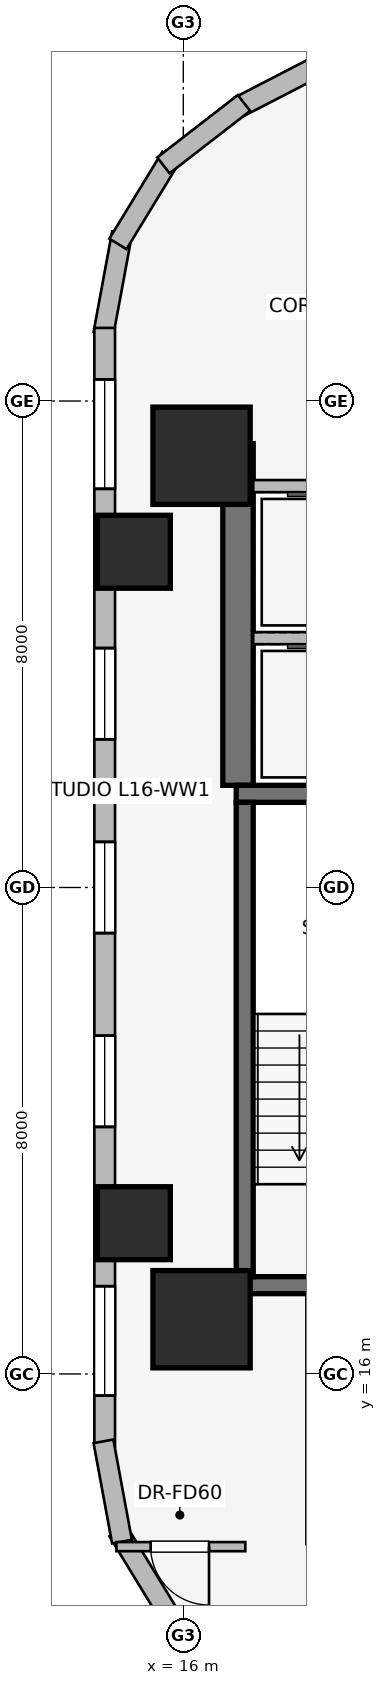
"""IFC4 building model, lengths in metres.
Left out: names, types, materials, properties, quantities, classifications, styles, units other than length and angle.
Written with IfcOpenShell. Run it as: python <this file> out.ifc"""

import sys

from ifc_helpers import new_model, si_unit, direction, frame, frame_2d, origin, origin_2d, place, context, subcontext, project, spatial, rectangle, extrude, element, fill, save


model = new_model("IFC4")
c1 = context("Model", 3, precision=1e-05, world=origin(), true_north=direction((0.0, 1.0)))
c2 = subcontext(c1, "Body", "Model", "MODEL_VIEW")
j1 = project(units=[si_unit("LENGTHUNIT", "METRE"), si_unit("PLANEANGLEUNIT", "RADIAN")], contexts=[c1])
p1 = place(None, origin())
s1 = spatial("IfcSite", under=j1, at=p1, CompositionType="ELEMENT")
p2 = place(p1, origin())
s2 = spatial("IfcBuilding", under=s1, at=p2, CompositionType="ELEMENT")
p3 = place(p2, frame((0.0, 0.0, 63.5)))
s3 = spatial("IfcBuildingStorey", under=s2, at=p3, CompositionType="ELEMENT", Elevation=63.5)
p4 = place(p3, frame((16.9, 25.68, 0.0), z_axis=(0.0, 0.0, 1.0), x_axis=(0.0, 1.0, 0.0)))
e1 = element("IfcWall", 1, at=p4, inside=s3, PredefinedType="SHEAR", context=c2, shape_type="SweptSolid", body=[
    extrude(rectangle(XDim=5.62, YDim=0.5, at=frame_2d((2.81, 0.0))), origin(), (0.0, 0.0, 1.0), 3.65),
])
for number, where, z_axis, x_axis in (
    (2, (16.87, 17.46, 0.0), (0.0, 0.0, 1.0), (1.0, 0.0, 0.0)),
    (3, (20.63, 25.54, 0.0), (0.0, 0.0, 1.0), (-1.0, 0.0, 0.0)),
):
    element("IfcWall", number, at=place(p3, frame(where, z_axis=z_axis, x_axis=x_axis)), inside=s3, PredefinedType="SHEAR", context=c2, shape_type="SweptSolid", body=[
        extrude(rectangle(XDim=3.76, YDim=0.28, at=frame_2d((1.88, 0.0))), origin(), (0.0, 0.0, 1.0), 3.65),
    ])
p5 = place(p3, frame((17.01, 25.4, 0.0), z_axis=(0.0, 0.0, 1.0), x_axis=(0.0, -1.0, 0.0)))
e4 = element("IfcWall", 4, at=p5, inside=s3, PredefinedType="SHEAR", context=c2, shape_type="SweptSolid", body=[
    extrude(rectangle(XDim=7.8, YDim=0.28, at=frame_2d((3.9, 0.0))), origin(), (0.0, 0.0, 1.0), 3.65),
])
for number, where, z_axis, x_axis in (
    (5, (16.3, 16.9, 0.0), (0.0, 0.0, 1.0), (1.0, 0.0, 0.0)),
    (6, (16.3, 31.1, 0.0), (0.0, 0.0, 1.0), (1.0, 0.0, 0.0)),
):
    element("IfcColumn", number, at=place(p3, frame(where, z_axis=z_axis, x_axis=x_axis)), inside=s3, PredefinedType="COLUMN", context=c2, shape_type="SweptSolid", body=[
        extrude(rectangle(XDim=1.6, YDim=1.6, at=origin_2d()), origin(), (0.0, 0.0, 1.0), 3.65),
    ])
for number, where, z_axis, x_axis in (
    (7, (15.187, 29.521, 0.0), (0.0, 0.0, 1.0), (1.0, 0.0, 0.0)),
    (8, (15.187, 18.479, 0.0), (0.0, 0.0, 1.0), (1.0, 0.0, 0.0)),
):
    element("IfcColumn", number, at=place(p3, frame(where, z_axis=z_axis, x_axis=x_axis)), inside=s3, PredefinedType="COLUMN", context=c2, shape_type="SweptSolid", body=[
        extrude(rectangle(XDim=1.2, YDim=1.2, at=origin_2d()), origin(), (0.0, 0.0, 1.0), 3.65),
    ])
p6 = place(p3, frame((16.924, 36.841, 0.0), z_axis=(0.0, 0.0, 1.0), x_axis=(0.888634413993, 0.458616264721, 0.0)))
e9 = element("IfcWall", 9, at=p6, inside=s3, PredefinedType="STANDARD", context=c2, shape_type="SweptSolid", body=[
    extrude(rectangle(XDim=20.531, YDim=0.34, at=frame_2d((10.266, 0.0))), origin(), (0.0, 0.0, 1.0), 2.684),
])
p7 = place(p6, frame((2.161, 0.0, 0.75)))
e10 = element("IfcOpeningElement", 10, at=p7, cuts=e9, PredefinedType="OPENING", context=c2, shape_type="SweptSolid", body=[
    extrude(rectangle(XDim=1.05, YDim=1.4, at=frame_2d((0.525, 0.7))), frame((0.0, 0.18, 0.0), z_axis=(0.0, -1.0, 0.0), x_axis=(1.0, 0.0, 0.0)), (0.0, 0.0, 1.0), 0.36),
])
p8 = place(p6, frame((5.903, 0.0, 0.75)))
e11 = element("IfcOpeningElement", 11, at=p8, cuts=e9, PredefinedType="OPENING", context=c2, shape_type="SweptSolid", body=[
    extrude(rectangle(XDim=1.5, YDim=1.5, at=frame_2d((0.75, 0.75))), frame((0.0, 0.18, 0.0), z_axis=(0.0, -1.0, 0.0), x_axis=(1.0, 0.0, 0.0)), (0.0, 0.0, 1.0), 0.36),
])
p9 = place(p6, frame((9.516, 0.0, 0.75)))
e12 = element("IfcOpeningElement", 12, at=p9, cuts=e9, PredefinedType="OPENING", context=c2, shape_type="SweptSolid", body=[
    extrude(rectangle(XDim=1.5, YDim=1.5, at=frame_2d((0.75, 0.75))), frame((0.0, 0.18, 0.0), z_axis=(0.0, -1.0, 0.0), x_axis=(1.0, 0.0, 0.0)), (0.0, 0.0, 1.0), 0.36),
])
p10 = place(p6, frame((13.129, 0.0, 0.75)))
e13 = element("IfcOpeningElement", 13, at=p10, cuts=e9, PredefinedType="OPENING", context=c2, shape_type="SweptSolid", body=[
    extrude(rectangle(XDim=1.5, YDim=1.5, at=frame_2d((0.75, 0.75))), frame((0.0, 0.18, 0.0), z_axis=(0.0, -1.0, 0.0), x_axis=(1.0, 0.0, 0.0)), (0.0, 0.0, 1.0), 0.36),
])
p11 = place(p6, frame((17.476, 0.0, 0.75)))
e14 = element("IfcOpeningElement", 14, at=p11, cuts=e9, PredefinedType="OPENING", context=c2, shape_type="SweptSolid", body=[
    extrude(rectangle(XDim=1.05, YDim=1.4, at=frame_2d((0.525, 0.7))), frame((0.0, 0.18, 0.0), z_axis=(0.0, -1.0, 0.0), x_axis=(1.0, 0.0, 0.0)), (0.0, 0.0, 1.0), 0.36),
])
p12 = place(p3, frame((14.687, 33.108, 0.0), z_axis=(0.0, 0.0, 1.0), x_axis=(0.181714143354, 0.983351397063, 0.0)))
e15 = element("IfcWall", 15, at=p12, inside=s3, PredefinedType="STANDARD", context=c2, shape_type="SweptSolid", body=[
    extrude(rectangle(XDim=1.678, YDim=0.33, at=frame_2d((0.839, 0.0))), origin(), (0.0, 0.0, 1.0), 3.39),
])
p13 = place(p3, frame((14.925, 34.583, 0.0), z_axis=(0.0, 0.0, 1.0), x_axis=(0.520584129191, 0.853810379671, 0.0)))
e16 = element("IfcWall", 16, at=p13, inside=s3, PredefinedType="STANDARD", context=c2, shape_type="SweptSolid", body=[
    extrude(rectangle(XDim=1.677, YDim=0.33, at=frame_2d((0.838, 0.0))), origin(), (0.0, 0.0, 1.0), 3.39),
])
p14 = place(p3, frame((15.673, 35.875, 0.0), z_axis=(0.0, 0.0, 1.0), x_axis=(0.790691856293, 0.61221433207, 0.0)))
e17 = element("IfcWall", 17, at=p14, inside=s3, PredefinedType="STANDARD", context=c2, shape_type="SweptSolid", body=[
    extrude(rectangle(XDim=1.676, YDim=0.33, at=frame_2d((0.838, 0.0))), origin(), (0.0, 0.0, 1.0), 3.39),
])
p15 = place(p3, frame((14.707, 14.798, 0.0), z_axis=(0.0, 0.0, 1.0), x_axis=(0.0, 1.0, 0.0)))
e18 = element("IfcWall", 18, at=p15, inside=s3, PredefinedType="STANDARD", context=c2, shape_type="SweptSolid", body=[
    extrude(rectangle(XDim=18.404, YDim=0.34, at=frame_2d((9.202, 0.0))), origin(), (0.0, 0.0, 1.0), 2.684),
])
p16 = place(p15, frame((0.845, 0.0, 0.75)))
e19 = element("IfcOpeningElement", 19, at=p16, cuts=e18, PredefinedType="OPENING", context=c2, shape_type="SweptSolid", body=[
    extrude(rectangle(XDim=1.8, YDim=1.5, at=frame_2d((0.9, 0.75))), frame((0.0, 0.18, 0.0), z_axis=(0.0, -1.0, 0.0), x_axis=(1.0, 0.0, 0.0)), (0.0, 0.0, 1.0), 0.36),
])
p17 = place(p15, frame((5.265, 0.0, 0.75)))
e20 = element("IfcOpeningElement", 20, at=p17, cuts=e18, PredefinedType="OPENING", context=c2, shape_type="SweptSolid", body=[
    extrude(rectangle(XDim=1.5, YDim=1.5, at=frame_2d((0.75, 0.75))), frame((0.0, 0.18, 0.0), z_axis=(0.0, -1.0, 0.0), x_axis=(1.0, 0.0, 0.0)), (0.0, 0.0, 1.0), 0.36),
])
p18 = place(p15, frame((8.452, 0.0, 0.75)))
e21 = element("IfcOpeningElement", 21, at=p18, cuts=e18, PredefinedType="OPENING", context=c2, shape_type="SweptSolid", body=[
    extrude(rectangle(XDim=1.5, YDim=1.5, at=frame_2d((0.75, 0.75))), frame((0.0, 0.18, 0.0), z_axis=(0.0, -1.0, 0.0), x_axis=(1.0, 0.0, 0.0)), (0.0, 0.0, 1.0), 0.36),
])
p19 = place(p15, frame((11.639, 0.0, 0.75)))
e22 = element("IfcOpeningElement", 22, at=p19, cuts=e18, PredefinedType="OPENING", context=c2, shape_type="SweptSolid", body=[
    extrude(rectangle(XDim=1.5, YDim=1.5, at=frame_2d((0.75, 0.75))), frame((0.0, 0.18, 0.0), z_axis=(0.0, -1.0, 0.0), x_axis=(1.0, 0.0, 0.0)), (0.0, 0.0, 1.0), 0.36),
])
p20 = place(p15, frame((15.758, 0.0, 0.75)))
e23 = element("IfcOpeningElement", 23, at=p20, cuts=e18, PredefinedType="OPENING", context=c2, shape_type="SweptSolid", body=[
    extrude(rectangle(XDim=1.8, YDim=1.5, at=frame_2d((0.9, 0.75))), frame((0.0, 0.18, 0.0), z_axis=(0.0, -1.0, 0.0), x_axis=(1.0, 0.0, 0.0)), (0.0, 0.0, 1.0), 0.36),
])
p21 = place(p3, frame((16.998, 11.099, 0.0), z_axis=(0.0, 0.0, 1.0), x_axis=(-0.790691856293, 0.61221433207, 0.0)))
e24 = element("IfcWall", 24, at=p21, inside=s3, PredefinedType="STANDARD", context=c2, shape_type="SweptSolid", body=[
    extrude(rectangle(XDim=1.676, YDim=0.33, at=frame_2d((0.838, 0.0))), origin(), (0.0, 0.0, 1.0), 3.39),
])
p22 = place(p3, frame((15.798, 11.985, 0.0), z_axis=(0.0, 0.0, 1.0), x_axis=(-0.520584129191, 0.853810379671, 0.0)))
e25 = element("IfcWall", 25, at=p22, inside=s3, PredefinedType="STANDARD", context=c2, shape_type="SweptSolid", body=[
    extrude(rectangle(XDim=1.677, YDim=0.33, at=frame_2d((0.838, 0.0))), origin(), (0.0, 0.0, 1.0), 3.39),
])
p23 = place(p3, frame((14.992, 13.242, 0.0), z_axis=(0.0, 0.0, 1.0), x_axis=(-0.181714143354, 0.983351397063, 0.0)))
e26 = element("IfcWall", 26, at=p23, inside=s3, PredefinedType="STANDARD", context=c2, shape_type="SweptSolid", body=[
    extrude(rectangle(XDim=1.678, YDim=0.33, at=frame_2d((0.839, 0.0))), origin(), (0.0, 0.0, 1.0), 3.39),
])
p24 = place(p3, frame((17.15, 28.1, 0.0), z_axis=(0.0, 0.0, 1.0), x_axis=(1.0, 0.0, 0.0)))
e27 = element("IfcWall", 27, at=p24, inside=s3, PredefinedType="PARTITIONING", context=c2, shape_type="SweptSolid", body=[
    extrude(rectangle(XDim=2.5, YDim=0.2, at=frame_2d((1.25, 0.0))), origin(), (0.0, 0.0, 1.0), 3.39),
])
p25 = place(p3, frame((19.65, 30.6, 0.0), z_axis=(0.0, 0.0, 1.0), x_axis=(-1.0, 0.0, 0.0)))
e28 = element("IfcWall", 28, at=p25, inside=s3, PredefinedType="PARTITIONING", context=c2, shape_type="SweptSolid", body=[
    extrude(rectangle(XDim=2.5, YDim=0.2, at=frame_2d((1.25, 0.0))), origin(), (0.0, 0.0, 1.0), 2.29),
])
p26 = place(p3, frame((17.02, 13.16, 0.0), z_axis=(0.0, 0.0, 1.0), x_axis=(-1.0, 0.0, 0.0)))
e29 = element("IfcWall", 29, at=p26, inside=s3, PredefinedType="PARTITIONING", context=c2, shape_type="SweptSolid", body=[
    extrude(rectangle(XDim=2.12, YDim=0.15, at=frame_2d((1.06, 0.0))), origin(), (0.0, 0.0, 1.0), 3.39),
])
p27 = place(p26, frame((0.597, 0.0, 0.0)))
e30 = element("IfcOpeningElement", 30, at=p27, cuts=e29, PredefinedType="OPENING", context=c2, shape_type="SweptSolid", body=[
    extrude(rectangle(XDim=0.96, YDim=2.0, at=frame_2d((0.48, 1.0))), frame((0.0, 0.085, 0.0), z_axis=(0.0, -1.0, 0.0), x_axis=(1.0, 0.0, 0.0)), (0.0, 0.0, 1.0), 0.17),
])
p28 = place(p16, origin())
e31 = element("IfcWindow", 31, at=p28, inside=s3, PartitioningType="SINGLE_PANEL", PredefinedType="WINDOW", context=c2, shape_type="SweptSolid", body=[
    extrude(rectangle(XDim=1.8, YDim=1.5, at=frame_2d((0.9, 0.75))), frame((0.0, 0.03, 0.0), z_axis=(0.0, -1.0, 0.0), x_axis=(1.0, 0.0, 0.0)), (0.0, 0.0, 1.0), 0.06),
])
fill(e19, e31)
p29 = place(p17, origin())
e32 = element("IfcWindow", 32, at=p29, inside=s3, PartitioningType="SINGLE_PANEL", PredefinedType="WINDOW", context=c2, shape_type="SweptSolid", body=[
    extrude(rectangle(XDim=1.5, YDim=1.5, at=frame_2d((0.75, 0.75))), frame((0.0, 0.03, 0.0), z_axis=(0.0, -1.0, 0.0), x_axis=(1.0, 0.0, 0.0)), (0.0, 0.0, 1.0), 0.06),
])
fill(e20, e32)
p30 = place(p18, origin())
e33 = element("IfcWindow", 33, at=p30, inside=s3, PartitioningType="SINGLE_PANEL", PredefinedType="WINDOW", context=c2, shape_type="SweptSolid", body=[
    extrude(rectangle(XDim=1.5, YDim=1.5, at=frame_2d((0.75, 0.75))), frame((0.0, 0.03, 0.0), z_axis=(0.0, -1.0, 0.0), x_axis=(1.0, 0.0, 0.0)), (0.0, 0.0, 1.0), 0.06),
])
fill(e21, e33)
p31 = place(p19, origin())
e34 = element("IfcWindow", 34, at=p31, inside=s3, PartitioningType="SINGLE_PANEL", PredefinedType="WINDOW", context=c2, shape_type="SweptSolid", body=[
    extrude(rectangle(XDim=1.5, YDim=1.5, at=frame_2d((0.75, 0.75))), frame((0.0, 0.03, 0.0), z_axis=(0.0, -1.0, 0.0), x_axis=(1.0, 0.0, 0.0)), (0.0, 0.0, 1.0), 0.06),
])
fill(e22, e34)
p32 = place(p20, origin())
e35 = element("IfcWindow", 35, at=p32, inside=s3, PartitioningType="SINGLE_PANEL", PredefinedType="WINDOW", context=c2, shape_type="SweptSolid", body=[
    extrude(rectangle(XDim=1.8, YDim=1.5, at=frame_2d((0.9, 0.75))), frame((0.0, 0.03, 0.0), z_axis=(0.0, -1.0, 0.0), x_axis=(1.0, 0.0, 0.0)), (0.0, 0.0, 1.0), 0.06),
])
fill(e23, e35)
p33 = place(p27, origin())
e36 = element("IfcDoor", 36, at=p33, inside=s3, OperationType="SINGLE_SWING_LEFT", PredefinedType="DOOR", context=c2, shape_type="SweptSolid", body=[
    extrude(rectangle(XDim=0.96, YDim=2.0, at=frame_2d((0.48, 1.0))), frame((0.0, 0.025, 0.0), z_axis=(0.0, -1.0, 0.0), x_axis=(1.0, 0.0, 0.0)), (0.0, 0.0, 1.0), 0.05),
])
fill(e30, e36)
save(model, sys.argv[1])
